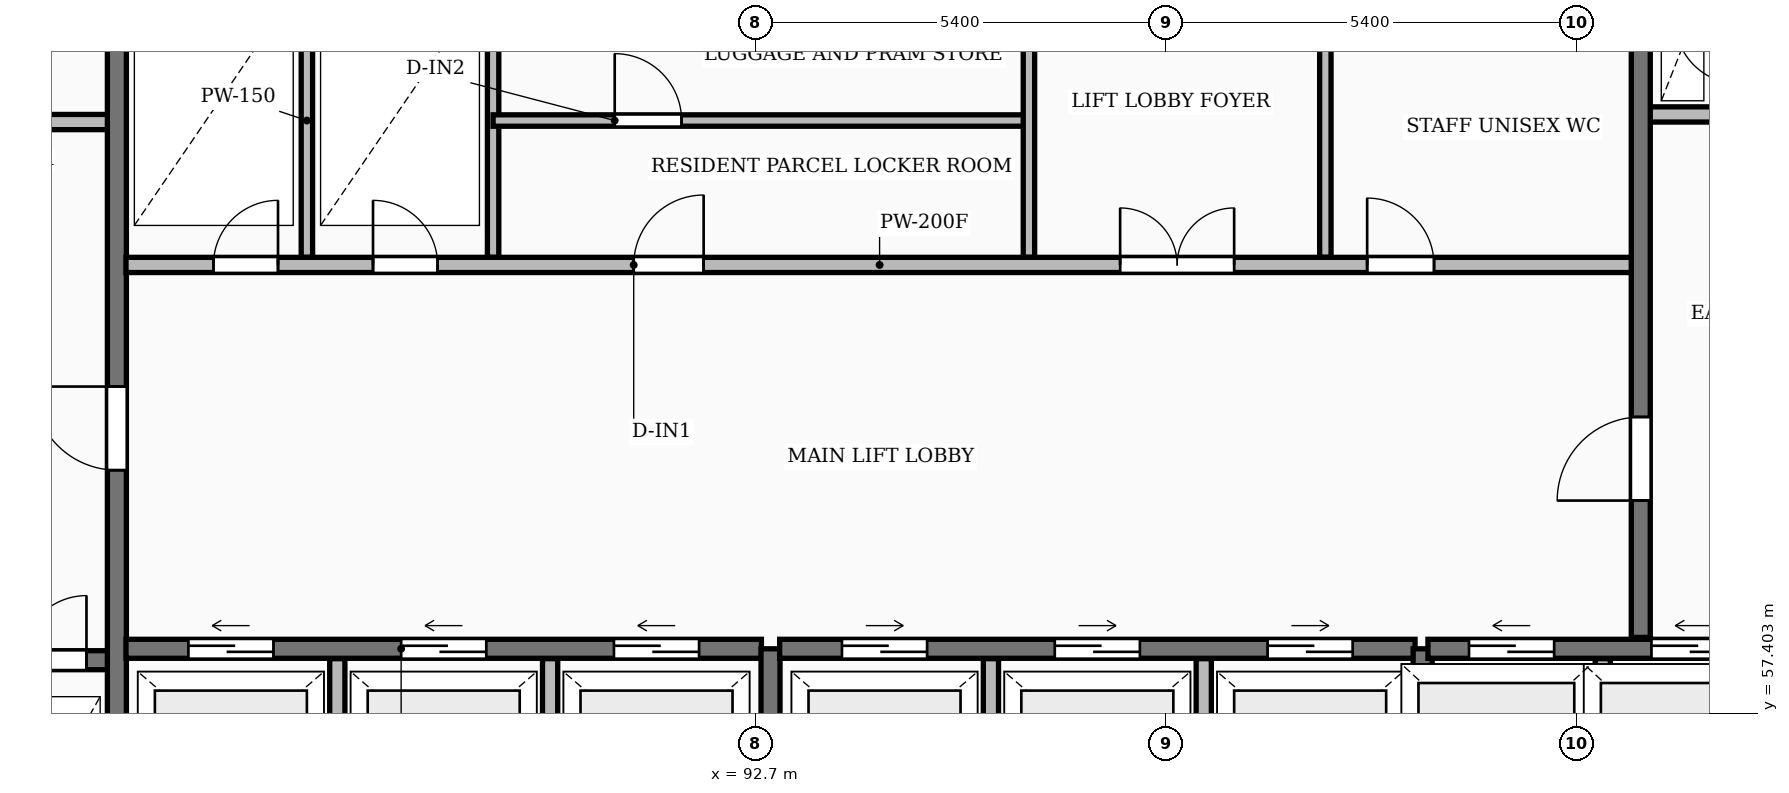
"""IFC4 building model, lengths in metres.
Left out: names, types, materials, properties, quantities, classifications, styles, units other than length and angle.
Written with IfcOpenShell. Run it as: python <this file> out.ifc"""

import sys

from ifc_helpers import new_model, si_unit, direction, frame, frame_2d, origin, place, context, subcontext, project, spatial, rectangle, extrude, element, fill, save


model = new_model("IFC4")
c1 = context("Model", 3, precision=1e-05, world=origin(), true_north=direction((0.0, 1.0)))
c2 = subcontext(c1, "Body", "Model", "MODEL_VIEW")
j1 = project(units=[si_unit("LENGTHUNIT", "METRE"), si_unit("PLANEANGLEUNIT", "RADIAN")], contexts=[c1])
p1 = place(None, origin())
s1 = spatial("IfcSite", under=j1, at=p1, CompositionType="ELEMENT")
p2 = place(p1, origin())
s2 = spatial("IfcBuilding", under=s1, at=p2, CompositionType="ELEMENT")
p3 = place(p2, frame((0.0, 0.0, 93.8)))
s3 = spatial("IfcBuildingStorey", under=s2, at=p3, CompositionType="ELEMENT", Elevation=93.8)
p4 = place(p3, frame((79.79, 58.1, 0.0), z_axis=(0.0, 0.0, 1.0), x_axis=(1.0, 0.0, 0.0)))
e1 = element("IfcWall", 1, at=p4, inside=s3, PredefinedType="SHEAR", context=c2, shape_type="SweptSolid", body=[
    extrude(rectangle(XDim=4.39, YDim=0.25, at=frame_2d((2.195, 0.0))), origin(), (0.0, 0.0, 1.0), 3.25),
])
p5 = place(p4, frame((1.05, 0.0, 0.0)))
e2 = element("IfcOpeningElement", 2, at=p5, cuts=e1, PredefinedType="OPENING", context=c2, shape_type="SweptSolid", body=[
    extrude(rectangle(XDim=1.12, YDim=2.12, at=frame_2d((0.56, 1.06))), frame((0.0, 0.135, 0.0), z_axis=(0.0, -1.0, 0.0), x_axis=(1.0, 0.0, 0.0)), (0.0, 0.0, 1.0), 0.27),
])
p6 = place(p4, frame((3.26, 0.0, 0.0)))
e3 = element("IfcOpeningElement", 3, at=p6, cuts=e1, PredefinedType="OPENING", context=c2, shape_type="SweptSolid", body=[
    extrude(rectangle(XDim=0.85, YDim=2.05, at=frame_2d((0.425, 1.025))), frame((0.0, 0.135, 0.0), z_axis=(0.0, -1.0, 0.0), x_axis=(1.0, 0.0, 0.0)), (0.0, 0.0, 1.0), 0.27),
])
p7 = place(p3, frame((79.79, 65.18, 0.0), z_axis=(0.0, 0.0, 1.0), x_axis=(1.0, 0.0, 0.0)))
e4 = element("IfcWall", 4, at=p7, inside=s3, PredefinedType="PARTITIONING", context=c2, shape_type="SweptSolid", body=[
    extrude(rectangle(XDim=4.39, YDim=0.2, at=frame_2d((2.195, 0.0))), origin(), (0.0, 0.0, 1.0), 2.97),
])
p8 = place(p7, frame((1.5, 0.0, 0.0)))
e5 = element("IfcOpeningElement", 5, at=p8, cuts=e4, PredefinedType="OPENING", context=c2, shape_type="SweptSolid", body=[
    extrude(rectangle(XDim=1.1, YDim=2.1, at=frame_2d((0.55, 1.05))), frame((0.0, 0.11, 0.0), z_axis=(0.0, -1.0, 0.0), x_axis=(1.0, 0.0, 0.0)), (0.0, 0.0, 1.0), 0.22),
])
p9 = place(p3, frame((84.3, 55.4, 0.0), z_axis=(0.0, 0.0, 1.0), x_axis=(0.0, 1.0, 0.0)))
e6 = element("IfcWall", 6, at=p9, inside=s3, PredefinedType="SHEAR", context=c2, shape_type="SweptSolid", body=[
    extrude(rectangle(XDim=11.6, YDim=0.25, at=frame_2d((5.8, 0.0))), origin(), (0.0, 0.0, 1.0), 3.25),
])
p10 = place(p9, frame((5.2, 0.0, 0.0)))
e7 = element("IfcOpeningElement", 7, at=p10, cuts=e6, PredefinedType="OPENING", context=c2, shape_type="SweptSolid", body=[
    extrude(rectangle(XDim=1.1, YDim=2.1, at=frame_2d((0.55, 1.05))), frame((0.0, 0.135, 0.0), z_axis=(0.0, -1.0, 0.0), x_axis=(1.0, 0.0, 0.0)), (0.0, 0.0, 1.0), 0.27),
])
for number, where, z_axis, x_axis in (
    (8, (87.2, 55.4, 0.0), (0.0, 0.0, 1.0), (0.0, 1.0, 0.0)),
    (9, (90.0, 55.4, 0.0), (0.0, 0.0, 1.0), (0.0, 1.0, 0.0)),
):
    element("IfcWall", number, at=place(p3, frame(where, z_axis=z_axis, x_axis=x_axis)), inside=s3, PredefinedType="PARTITIONING", context=c2, shape_type="SweptSolid", body=[
        extrude(rectangle(XDim=2.72, YDim=0.2, at=frame_2d((1.36, 0.0))), origin(), (0.0, 0.0, 1.0), 2.97),
    ])
p11 = place(p3, frame((84.42, 58.25, 0.0), z_axis=(0.0, 0.0, 1.0), x_axis=(1.0, 0.0, 0.0)))
e10 = element("IfcWall", 10, at=p11, inside=s3, PredefinedType="SHEAR", context=c2, shape_type="SweptSolid", body=[
    extrude(rectangle(XDim=8.36, YDim=0.25, at=frame_2d((4.18, 0.0))), origin(), (0.0, 0.0, 1.0), 3.25),
])
p12 = place(p11, frame((0.82, 0.0, 0.0)))
e11 = element("IfcOpeningElement", 11, at=p12, cuts=e10, PredefinedType="OPENING", context=c2, shape_type="SweptSolid", body=[
    extrude(rectangle(XDim=1.12, YDim=2.12, at=frame_2d((0.56, 1.06))), frame((0.0, 0.135, 0.0), z_axis=(0.0, -1.0, 0.0), x_axis=(1.0, 0.0, 0.0)), (0.0, 0.0, 1.0), 0.27),
])
p13 = place(p11, frame((3.62, 0.0, 0.0)))
e12 = element("IfcOpeningElement", 12, at=p13, cuts=e10, PredefinedType="OPENING", context=c2, shape_type="SweptSolid", body=[
    extrude(rectangle(XDim=1.12, YDim=2.12, at=frame_2d((0.56, 1.06))), frame((0.0, 0.135, 0.0), z_axis=(0.0, -1.0, 0.0), x_axis=(1.0, 0.0, 0.0)), (0.0, 0.0, 1.0), 0.27),
])
p14 = place(p11, frame((6.42, 0.0, 0.0)))
e13 = element("IfcOpeningElement", 13, at=p14, cuts=e10, PredefinedType="OPENING", context=c2, shape_type="SweptSolid", body=[
    extrude(rectangle(XDim=1.12, YDim=2.12, at=frame_2d((0.56, 1.06))), frame((0.0, 0.135, 0.0), z_axis=(0.0, -1.0, 0.0), x_axis=(1.0, 0.0, 0.0)), (0.0, 0.0, 1.0), 0.27),
])
p15 = place(p3, frame((92.9, 55.4, 0.0), z_axis=(0.0, 0.0, 1.0), x_axis=(0.0, 1.0, 0.0)))
e14 = element("IfcWall", 14, at=p15, inside=s3, PredefinedType="SHEAR", context=c2, shape_type="SweptSolid", body=[
    extrude(rectangle(XDim=2.85, YDim=0.25, at=frame_2d((1.425, 0.0))), origin(), (0.0, 0.0, 1.0), 3.25),
])
for number, where, z_axis, x_axis in (
    (15, (95.8, 55.4, 0.0), (0.0, 0.0, 1.0), (0.0, 1.0, 0.0)),
    (16, (98.6, 55.4, 0.0), (0.0, 0.0, 1.0), (0.0, 1.0, 0.0)),
):
    element("IfcWall", number, at=place(p3, frame(where, z_axis=z_axis, x_axis=x_axis)), inside=s3, PredefinedType="PARTITIONING", context=c2, shape_type="SweptSolid", body=[
        extrude(rectangle(XDim=2.72, YDim=0.2, at=frame_2d((1.36, 0.0))), origin(), (0.0, 0.0, 1.0), 2.97),
    ])
p16 = place(p3, frame((93.02, 58.25, 0.0), z_axis=(0.0, 0.0, 1.0), x_axis=(1.0, 0.0, 0.0)))
e17 = element("IfcWall", 17, at=p16, inside=s3, PredefinedType="SHEAR", context=c2, shape_type="SweptSolid", body=[
    extrude(rectangle(XDim=8.36, YDim=0.25, at=frame_2d((4.18, 0.0))), origin(), (0.0, 0.0, 1.0), 3.25),
])
p17 = place(p16, frame((0.82, 0.0, 0.0)))
e18 = element("IfcOpeningElement", 18, at=p17, cuts=e17, PredefinedType="OPENING", context=c2, shape_type="SweptSolid", body=[
    extrude(rectangle(XDim=1.12, YDim=2.12, at=frame_2d((0.56, 1.06))), frame((0.0, 0.135, 0.0), z_axis=(0.0, -1.0, 0.0), x_axis=(1.0, 0.0, 0.0)), (0.0, 0.0, 1.0), 0.27),
])
p18 = place(p16, frame((3.62, 0.0, 0.0)))
e19 = element("IfcOpeningElement", 19, at=p18, cuts=e17, PredefinedType="OPENING", context=c2, shape_type="SweptSolid", body=[
    extrude(rectangle(XDim=1.12, YDim=2.12, at=frame_2d((0.56, 1.06))), frame((0.0, 0.135, 0.0), z_axis=(0.0, -1.0, 0.0), x_axis=(1.0, 0.0, 0.0)), (0.0, 0.0, 1.0), 0.27),
])
p19 = place(p16, frame((6.42, 0.0, 0.0)))
e20 = element("IfcOpeningElement", 20, at=p19, cuts=e17, PredefinedType="OPENING", context=c2, shape_type="SweptSolid", body=[
    extrude(rectangle(XDim=1.12, YDim=2.12, at=frame_2d((0.56, 1.06))), frame((0.0, 0.135, 0.0), z_axis=(0.0, -1.0, 0.0), x_axis=(1.0, 0.0, 0.0)), (0.0, 0.0, 1.0), 0.27),
])
p20 = place(p3, frame((101.48, 55.4, 0.0), z_axis=(0.0, 0.0, 1.0), x_axis=(0.0, 1.0, 0.0)))
e21 = element("IfcWall", 21, at=p20, inside=s3, PredefinedType="SHEAR", context=c2, shape_type="SweptSolid", body=[
    extrude(rectangle(XDim=2.85, YDim=0.25, at=frame_2d((1.425, 0.0))), origin(), (0.0, 0.0, 1.0), 3.25),
])
p21 = place(p3, frame((103.85, 55.4, 0.0), z_axis=(0.0, 0.0, 1.0), x_axis=(0.0, 1.0, 0.0)))
e22 = element("IfcWall", 22, at=p21, inside=s3, PredefinedType="PARTITIONING", context=c2, shape_type="SweptSolid", body=[
    extrude(rectangle(XDim=2.72, YDim=0.2, at=frame_2d((1.36, 0.0))), origin(), (0.0, 0.0, 1.0), 2.97),
])
p22 = place(p3, frame((101.55, 58.25, 0.0), z_axis=(0.0, 0.0, 1.0), x_axis=(1.0, 0.0, 0.0)))
e23 = element("IfcWall", 23, at=p22, inside=s3, PredefinedType="SHEAR", context=c2, shape_type="SweptSolid", body=[
    extrude(rectangle(XDim=4.6, YDim=0.25, at=frame_2d((2.3, 0.0))), origin(), (0.0, 0.0, 1.0), 3.25),
])
p23 = place(p22, frame((0.54, 0.0, 0.0)))
e24 = element("IfcOpeningElement", 24, at=p23, cuts=e23, PredefinedType="OPENING", context=c2, shape_type="SweptSolid", body=[
    extrude(rectangle(XDim=1.12, YDim=2.12, at=frame_2d((0.56, 1.06))), frame((0.0, 0.135, 0.0), z_axis=(0.0, -1.0, 0.0), x_axis=(1.0, 0.0, 0.0)), (0.0, 0.0, 1.0), 0.27),
])
p24 = place(p22, frame((2.94, 0.0, 0.0)))
e25 = element("IfcOpeningElement", 25, at=p24, cuts=e23, PredefinedType="OPENING", context=c2, shape_type="SweptSolid", body=[
    extrude(rectangle(XDim=1.12, YDim=2.12, at=frame_2d((0.56, 1.06))), frame((0.0, 0.135, 0.0), z_axis=(0.0, -1.0, 0.0), x_axis=(1.0, 0.0, 0.0)), (0.0, 0.0, 1.0), 0.27),
])
for number, where, z_axis, x_axis in (
    (26, (86.8, 63.4, 0.0), (0.0, 0.0, 1.0), (0.0, 1.0, 0.0)),
    (27, (89.25, 63.4, 0.0), (0.0, 0.0, 1.0), (0.0, 1.0, 0.0)),
):
    element("IfcWall", number, at=place(p3, frame(where, z_axis=z_axis, x_axis=x_axis)), inside=s3, PredefinedType="PARTITIONING", context=c2, shape_type="SweptSolid", body=[
        extrude(rectangle(XDim=3.6, YDim=0.15, at=frame_2d((1.8, 0.0))), origin(), (0.0, 0.0, 1.0), 2.97),
    ])
p25 = place(p3, frame((89.25, 65.2, 0.0), z_axis=(0.0, 0.0, 1.0), x_axis=(1.0, 0.0, 0.0)))
e28 = element("IfcWall", 28, at=p25, inside=s3, PredefinedType="PARTITIONING", context=c2, shape_type="SweptSolid", body=[
    extrude(rectangle(XDim=7.05, YDim=0.15, at=frame_2d((3.525, 0.0))), origin(), (0.0, 0.0, 1.0), 2.97),
])
p26 = place(p25, frame((1.6, 0.0, 0.0)))
e29 = element("IfcOpeningElement", 29, at=p26, cuts=e28, PredefinedType="OPENING", context=c2, shape_type="SweptSolid", body=[
    extrude(rectangle(XDim=0.88, YDim=2.06, at=frame_2d((0.44, 1.03))), frame((0.0, 0.085, 0.0), z_axis=(0.0, -1.0, 0.0), x_axis=(1.0, 0.0, 0.0)), (0.0, 0.0, 1.0), 0.17),
])
for number, where, z_axis, x_axis in (
    (30, (96.3, 63.4, 0.0), (0.0, 0.0, 1.0), (0.0, 1.0, 0.0)),
    (31, (100.2, 63.4, 0.0), (0.0, 0.0, 1.0), (0.0, 1.0, 0.0)),
):
    element("IfcWall", number, at=place(p3, frame(where, z_axis=z_axis, x_axis=x_axis)), inside=s3, PredefinedType="PARTITIONING", context=c2, shape_type="SweptSolid", body=[
        extrude(rectangle(XDim=3.6, YDim=0.15, at=frame_2d((1.8, 0.0))), origin(), (0.0, 0.0, 1.0), 2.97),
    ])
p27 = place(p3, frame((84.42, 63.3, 0.0), z_axis=(0.0, 0.0, 1.0), x_axis=(1.0, 0.0, 0.0)))
e32 = element("IfcWall", 32, at=p27, inside=s3, PredefinedType="PARTITIONING", context=c2, shape_type="SweptSolid", body=[
    extrude(rectangle(XDim=19.83, YDim=0.2, at=frame_2d((9.915, 0.0))), origin(), (0.0, 0.0, 1.0), 2.97),
])
p28 = place(p27, frame((1.15, 0.0, 0.0)))
e33 = element("IfcOpeningElement", 33, at=p28, cuts=e32, PredefinedType="OPENING", context=c2, shape_type="SweptSolid", body=[
    extrude(rectangle(XDim=0.85, YDim=2.05, at=frame_2d((0.425, 1.025))), frame((0.0, 0.11, 0.0), z_axis=(0.0, -1.0, 0.0), x_axis=(1.0, 0.0, 0.0)), (0.0, 0.0, 1.0), 0.22),
])
p29 = place(p27, frame((3.25, 0.0, 0.0)))
e34 = element("IfcOpeningElement", 34, at=p29, cuts=e32, PredefinedType="OPENING", context=c2, shape_type="SweptSolid", body=[
    extrude(rectangle(XDim=0.85, YDim=2.05, at=frame_2d((0.425, 1.025))), frame((0.0, 0.11, 0.0), z_axis=(0.0, -1.0, 0.0), x_axis=(1.0, 0.0, 0.0)), (0.0, 0.0, 1.0), 0.22),
])
p30 = place(p27, frame((13.08, 0.0, 0.0)))
e35 = element("IfcOpeningElement", 35, at=p30, cuts=e32, PredefinedType="OPENING", context=c2, shape_type="SweptSolid", body=[
    extrude(rectangle(XDim=1.5, YDim=2.2, at=frame_2d((0.75, 1.1))), frame((0.0, 0.11, 0.0), z_axis=(0.0, -1.0, 0.0), x_axis=(1.0, 0.0, 0.0)), (0.0, 0.0, 1.0), 0.22),
])
p31 = place(p27, frame((6.68, 0.0, 0.0)))
e36 = element("IfcOpeningElement", 36, at=p31, cuts=e32, PredefinedType="OPENING", context=c2, shape_type="SweptSolid", body=[
    extrude(rectangle(XDim=0.92, YDim=2.08, at=frame_2d((0.46, 1.04))), frame((0.0, 0.11, 0.0), z_axis=(0.0, -1.0, 0.0), x_axis=(1.0, 0.0, 0.0)), (0.0, 0.0, 1.0), 0.22),
])
p32 = place(p27, frame((16.33, 0.0, 0.0)))
e37 = element("IfcOpeningElement", 37, at=p32, cuts=e32, PredefinedType="OPENING", context=c2, shape_type="SweptSolid", body=[
    extrude(rectangle(XDim=0.88, YDim=2.06, at=frame_2d((0.44, 1.03))), frame((0.0, 0.11, 0.0), z_axis=(0.0, -1.0, 0.0), x_axis=(1.0, 0.0, 0.0)), (0.0, 0.0, 1.0), 0.22),
])
p33 = place(p3, frame((104.45, 65.28, 0.0), z_axis=(0.0, 0.0, 1.0), x_axis=(1.0, 0.0, 0.0)))
e38 = element("IfcWall", 38, at=p33, inside=s3, PredefinedType="PARTITIONING", context=c2, shape_type="SweptSolid", body=[
    extrude(rectangle(XDim=1.2, YDim=0.2, at=frame_2d((0.6, 0.0))), origin(), (0.0, 0.0, 1.0), 2.97),
])
p34 = place(p3, frame((104.35, 58.4, 0.0), z_axis=(0.0, 0.0, 1.0), x_axis=(0.0, 1.0, 0.0)))
e39 = element("IfcWall", 39, at=p34, inside=s3, PredefinedType="SHEAR", context=c2, shape_type="SweptSolid", body=[
    extrude(rectangle(XDim=8.6, YDim=0.25, at=frame_2d((4.3, 0.0))), origin(), (0.0, 0.0, 1.0), 3.25),
])
p35 = place(p34, frame((1.8, 0.0, 0.0)))
e40 = element("IfcOpeningElement", 40, at=p35, cuts=e39, PredefinedType="OPENING", context=c2, shape_type="SweptSolid", body=[
    extrude(rectangle(XDim=1.1, YDim=2.1, at=frame_2d((0.55, 1.05))), frame((0.0, 0.135, 0.0), z_axis=(0.0, -1.0, 0.0), x_axis=(1.0, 0.0, 0.0)), (0.0, 0.0, 1.0), 0.27),
])
p36 = place(p6, origin())
e41 = element("IfcDoor", 41, at=p36, inside=s3, OperationType="SINGLE_SWING_RIGHT", PredefinedType="DOOR", context=c2, shape_type="SweptSolid", body=[
    extrude(rectangle(XDim=0.85, YDim=2.05, at=frame_2d((0.425, 1.025))), frame((0.0, 0.025, 0.0), z_axis=(0.0, -1.0, 0.0), x_axis=(1.0, 0.0, 0.0)), (0.0, 0.0, 1.0), 0.05),
])
fill(e3, e41)
p37 = place(p10, origin())
e42 = element("IfcDoor", 42, at=p37, inside=s3, OperationType="SINGLE_SWING_RIGHT", PredefinedType="DOOR", context=c2, shape_type="SweptSolid", body=[
    extrude(rectangle(XDim=1.1, YDim=2.1, at=frame_2d((0.55, 1.05))), frame((0.0, 0.025, 0.0), z_axis=(0.0, -1.0, 0.0), x_axis=(1.0, 0.0, 0.0)), (0.0, 0.0, 1.0), 0.05),
])
fill(e7, e42)
p38 = place(p12, origin())
e43 = element("IfcDoor", 43, at=p38, inside=s3, OperationType="SLIDING_TO_LEFT", PredefinedType="DOOR", context=c2, shape_type="SweptSolid", body=[
    extrude(rectangle(XDim=1.12, YDim=2.12, at=frame_2d((0.56, 1.06))), frame((0.0, 0.025, 0.0), z_axis=(0.0, -1.0, 0.0), x_axis=(1.0, 0.0, 0.0)), (0.0, 0.0, 1.0), 0.05),
])
fill(e11, e43)
p39 = place(p13, origin())
e44 = element("IfcDoor", 44, at=p39, inside=s3, OperationType="SLIDING_TO_LEFT", PredefinedType="DOOR", context=c2, shape_type="SweptSolid", body=[
    extrude(rectangle(XDim=1.12, YDim=2.12, at=frame_2d((0.56, 1.06))), frame((0.0, 0.025, 0.0), z_axis=(0.0, -1.0, 0.0), x_axis=(1.0, 0.0, 0.0)), (0.0, 0.0, 1.0), 0.05),
])
fill(e12, e44)
p40 = place(p14, origin())
e45 = element("IfcDoor", 45, at=p40, inside=s3, OperationType="SLIDING_TO_LEFT", PredefinedType="DOOR", context=c2, shape_type="SweptSolid", body=[
    extrude(rectangle(XDim=1.12, YDim=2.12, at=frame_2d((0.56, 1.06))), frame((0.0, 0.025, 0.0), z_axis=(0.0, -1.0, 0.0), x_axis=(1.0, 0.0, 0.0)), (0.0, 0.0, 1.0), 0.05),
])
fill(e13, e45)
p41 = place(p17, origin())
e46 = element("IfcDoor", 46, at=p41, inside=s3, OperationType="SLIDING_TO_RIGHT", PredefinedType="DOOR", context=c2, shape_type="SweptSolid", body=[
    extrude(rectangle(XDim=1.12, YDim=2.12, at=frame_2d((0.56, 1.06))), frame((0.0, 0.025, 0.0), z_axis=(0.0, -1.0, 0.0), x_axis=(1.0, 0.0, 0.0)), (0.0, 0.0, 1.0), 0.05),
])
fill(e18, e46)
p42 = place(p18, origin())
e47 = element("IfcDoor", 47, at=p42, inside=s3, OperationType="SLIDING_TO_RIGHT", PredefinedType="DOOR", context=c2, shape_type="SweptSolid", body=[
    extrude(rectangle(XDim=1.12, YDim=2.12, at=frame_2d((0.56, 1.06))), frame((0.0, 0.025, 0.0), z_axis=(0.0, -1.0, 0.0), x_axis=(1.0, 0.0, 0.0)), (0.0, 0.0, 1.0), 0.05),
])
fill(e19, e47)
p43 = place(p19, origin())
e48 = element("IfcDoor", 48, at=p43, inside=s3, OperationType="SLIDING_TO_RIGHT", PredefinedType="DOOR", context=c2, shape_type="SweptSolid", body=[
    extrude(rectangle(XDim=1.12, YDim=2.12, at=frame_2d((0.56, 1.06))), frame((0.0, 0.025, 0.0), z_axis=(0.0, -1.0, 0.0), x_axis=(1.0, 0.0, 0.0)), (0.0, 0.0, 1.0), 0.05),
])
fill(e20, e48)
p44 = place(p23, origin())
e49 = element("IfcDoor", 49, at=p44, inside=s3, OperationType="SLIDING_TO_LEFT", PredefinedType="DOOR", context=c2, shape_type="SweptSolid", body=[
    extrude(rectangle(XDim=1.12, YDim=2.12, at=frame_2d((0.56, 1.06))), frame((0.0, 0.025, 0.0), z_axis=(0.0, -1.0, 0.0), x_axis=(1.0, 0.0, 0.0)), (0.0, 0.0, 1.0), 0.05),
])
fill(e24, e49)
p45 = place(p24, origin())
e50 = element("IfcDoor", 50, at=p45, inside=s3, OperationType="SLIDING_TO_LEFT", PredefinedType="DOOR", context=c2, shape_type="SweptSolid", body=[
    extrude(rectangle(XDim=1.12, YDim=2.12, at=frame_2d((0.56, 1.06))), frame((0.0, 0.025, 0.0), z_axis=(0.0, -1.0, 0.0), x_axis=(1.0, 0.0, 0.0)), (0.0, 0.0, 1.0), 0.05),
])
fill(e25, e50)
p46 = place(p26, origin())
e51 = element("IfcDoor", 51, at=p46, inside=s3, OperationType="SINGLE_SWING_LEFT", PredefinedType="DOOR", context=c2, shape_type="SweptSolid", body=[
    extrude(rectangle(XDim=0.88, YDim=2.06, at=frame_2d((0.44, 1.03))), frame((0.0, 0.025, 0.0), z_axis=(0.0, -1.0, 0.0), x_axis=(1.0, 0.0, 0.0)), (0.0, 0.0, 1.0), 0.05),
])
fill(e29, e51)
p47 = place(p28, origin())
e52 = element("IfcDoor", 52, at=p47, inside=s3, OperationType="SINGLE_SWING_RIGHT", PredefinedType="DOOR", context=c2, shape_type="SweptSolid", body=[
    extrude(rectangle(XDim=0.85, YDim=2.05, at=frame_2d((0.425, 1.025))), frame((0.0, 0.025, 0.0), z_axis=(0.0, -1.0, 0.0), x_axis=(1.0, 0.0, 0.0)), (0.0, 0.0, 1.0), 0.05),
])
fill(e33, e52)
p48 = place(p29, origin())
e53 = element("IfcDoor", 53, at=p48, inside=s3, OperationType="SINGLE_SWING_LEFT", PredefinedType="DOOR", context=c2, shape_type="SweptSolid", body=[
    extrude(rectangle(XDim=0.85, YDim=2.05, at=frame_2d((0.425, 1.025))), frame((0.0, 0.025, 0.0), z_axis=(0.0, -1.0, 0.0), x_axis=(1.0, 0.0, 0.0)), (0.0, 0.0, 1.0), 0.05),
])
fill(e34, e53)
p49 = place(p30, origin())
e54 = element("IfcDoor", 54, at=p49, inside=s3, OperationType="DOUBLE_DOOR_SINGLE_SWING", PredefinedType="DOOR", context=c2, shape_type="SweptSolid", body=[
    extrude(rectangle(XDim=1.5, YDim=2.2, at=frame_2d((0.75, 1.1))), frame((0.0, 0.025, 0.0), z_axis=(0.0, -1.0, 0.0), x_axis=(1.0, 0.0, 0.0)), (0.0, 0.0, 1.0), 0.05),
])
fill(e35, e54)
p50 = place(p31, origin())
e55 = element("IfcDoor", 55, at=p50, inside=s3, OperationType="SINGLE_SWING_RIGHT", PredefinedType="DOOR", context=c2, shape_type="SweptSolid", body=[
    extrude(rectangle(XDim=0.92, YDim=2.08, at=frame_2d((0.46, 1.04))), frame((0.0, 0.025, 0.0), z_axis=(0.0, -1.0, 0.0), x_axis=(1.0, 0.0, 0.0)), (0.0, 0.0, 1.0), 0.05),
])
fill(e36, e55)
p51 = place(p32, origin())
e56 = element("IfcDoor", 56, at=p51, inside=s3, OperationType="SINGLE_SWING_LEFT", PredefinedType="DOOR", context=c2, shape_type="SweptSolid", body=[
    extrude(rectangle(XDim=0.88, YDim=2.06, at=frame_2d((0.44, 1.03))), frame((0.0, 0.025, 0.0), z_axis=(0.0, -1.0, 0.0), x_axis=(1.0, 0.0, 0.0)), (0.0, 0.0, 1.0), 0.05),
])
fill(e37, e56)
p52 = place(p35, origin())
e57 = element("IfcDoor", 57, at=p52, inside=s3, OperationType="SINGLE_SWING_LEFT", PredefinedType="DOOR", context=c2, shape_type="SweptSolid", body=[
    extrude(rectangle(XDim=1.1, YDim=2.1, at=frame_2d((0.55, 1.05))), frame((0.0, 0.025, 0.0), z_axis=(0.0, -1.0, 0.0), x_axis=(1.0, 0.0, 0.0)), (0.0, 0.0, 1.0), 0.05),
])
fill(e40, e57)
save(model, sys.argv[1])
